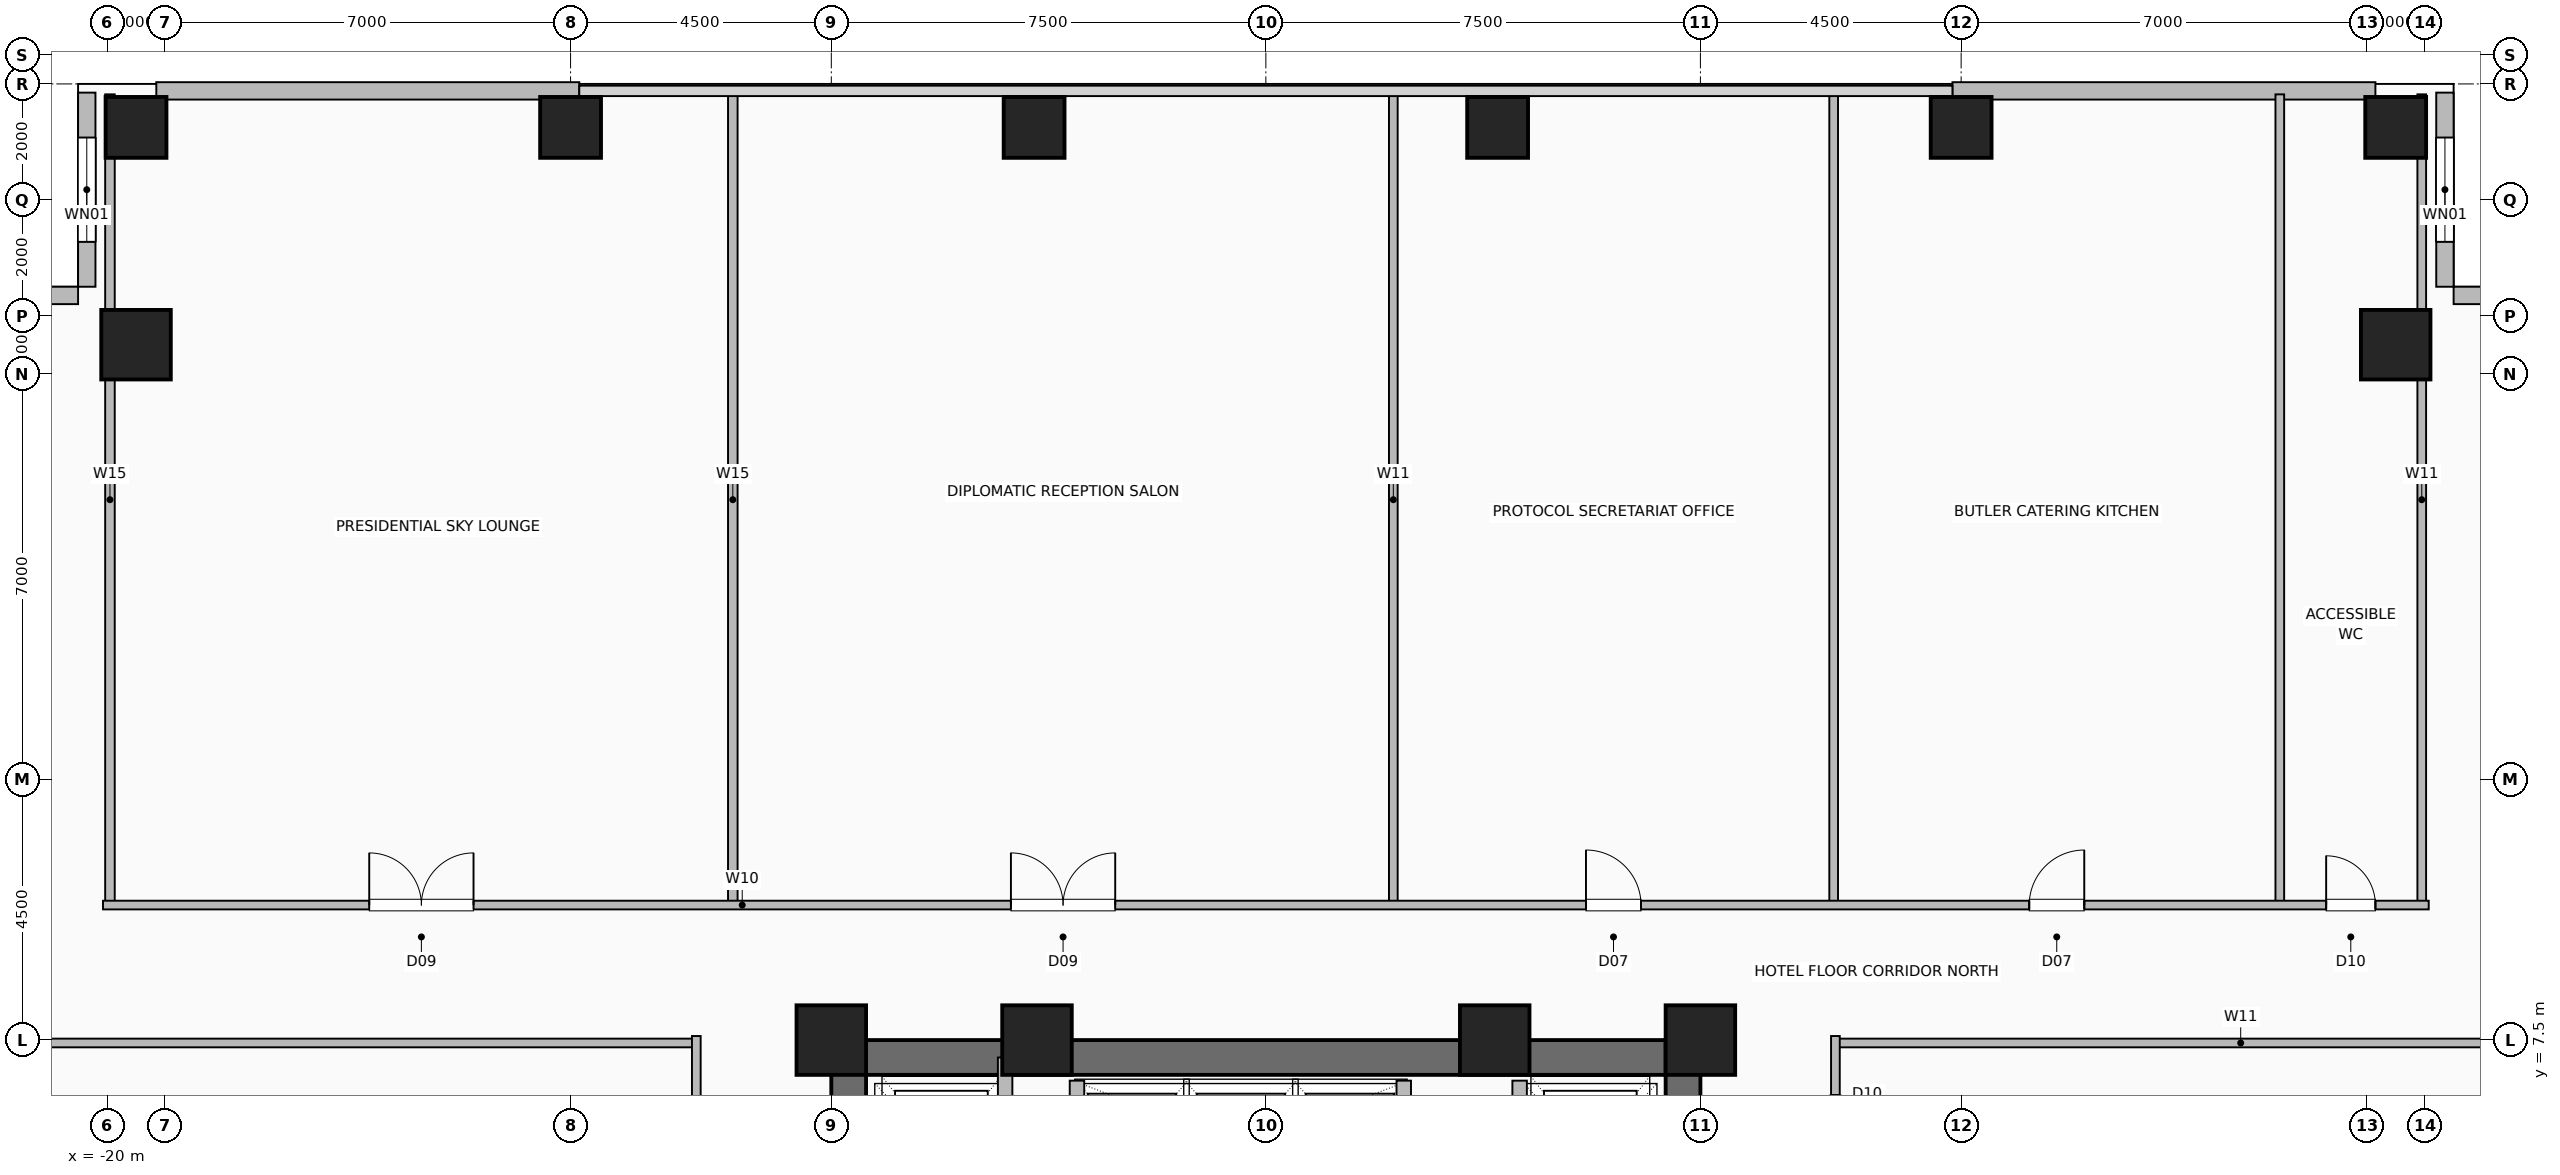
"""IFC4 building model, lengths in metres.
Left out: names, types, materials, properties, quantities, classifications, styles, units other than length and angle.
Written with IfcOpenShell. Run it as: python <this file> out.ifc"""

import sys

from ifc_helpers import new_model, si_unit, direction, frame, frame_2d, origin, origin_2d, place, context, subcontext, project, spatial, rectangle, hollow_rectangle, extrude, element, fill, save


model = new_model("IFC4")
c1 = context("Model", 3, precision=1e-05, world=origin(), true_north=direction((0.0, 1.0)))
c2 = subcontext(c1, "Body", "Model", "MODEL_VIEW")
j1 = project(units=[si_unit("LENGTHUNIT", "METRE"), si_unit("PLANEANGLEUNIT", "RADIAN")], contexts=[c1])
p1 = place(None, origin())
s1 = spatial("IfcSite", under=j1, at=p1, CompositionType="ELEMENT")
p2 = place(p1, origin())
s2 = spatial("IfcBuilding", under=s1, at=p2, CompositionType="ELEMENT")
p3 = place(p2, frame((0.0, 0.0, 76.0)))
s3 = spatial("IfcBuildingStorey", under=s2, at=p3, CompositionType="ELEMENT", Elevation=76.0)
for number, where, z_axis, x_axis in (
    (1, (7.5, 7.5, 0.0), (0.0, 0.0, 1.0), (1.0, 0.0, 0.0)),
    (2, (3.95, 7.5, 0.0), (0.0, 0.0, 1.0), (1.0, 0.0, 0.0)),
    (3, (-3.95, 7.5, 0.0), (0.0, 0.0, 1.0), (1.0, 0.0, 0.0)),
    (4, (-7.5, 7.5, 0.0), (0.0, 0.0, 1.0), (1.0, 0.0, 0.0)),
):
    element("IfcColumn", number, at=place(p3, frame(where, z_axis=z_axis, x_axis=x_axis)), inside=s3, PredefinedType="COLUMN", context=c2, shape_type="SweptSolid", body=[
        extrude(hollow_rectangle(XDim=1.2, YDim=1.2, WallThickness=0.055, at=origin_2d()), origin(), (0.0, 0.0, 1.0), 3.5),
    ])
for number, where, z_axis, x_axis in (
    (5, (-19.5, 23.25, 0.0), (0.0, 0.0, 1.0), (1.0, 0.0, 0.0)),
    (6, (-12.0, 23.25, 0.0), (0.0, 0.0, 1.0), (1.0, 0.0, 0.0)),
    (7, (-4.0, 23.25, 0.0), (0.0, 0.0, 1.0), (1.0, 0.0, 0.0)),
    (8, (4.0, 23.25, 0.0), (0.0, 0.0, 1.0), (1.0, 0.0, 0.0)),
    (9, (12.0, 23.25, 0.0), (0.0, 0.0, 1.0), (1.0, 0.0, 0.0)),
    (10, (19.5, 23.25, 0.0), (0.0, 0.0, 1.0), (1.0, 0.0, 0.0)),
):
    element("IfcColumn", number, at=place(p3, frame(where, z_axis=z_axis, x_axis=x_axis)), inside=s3, PredefinedType="COLUMN", context=c2, shape_type="SweptSolid", body=[
        extrude(hollow_rectangle(XDim=1.05, YDim=1.05, WallThickness=0.05, at=origin_2d()), origin(), (0.0, 0.0, 1.0), 3.5),
    ])
for number, where, z_axis, x_axis in (
    (11, (19.5, 19.5, 0.0), (0.0, 0.0, 1.0), (1.0, 0.0, 0.0)),
    (12, (-19.5, 19.5, 0.0), (0.0, 0.0, 1.0), (1.0, 0.0, 0.0)),
):
    element("IfcColumn", number, at=place(p3, frame(where, z_axis=z_axis, x_axis=x_axis)), inside=s3, PredefinedType="COLUMN", context=c2, shape_type="SweptSolid", body=[
        extrude(hollow_rectangle(XDim=1.2, YDim=1.2, WallThickness=0.055, at=origin_2d()), origin(), (0.0, 0.0, 1.0), 3.5),
    ])
for number, where, z_axis, x_axis in (
    (13, (-19.15, 23.88, 0.0), (0.0, 0.0, 1.0), (1.0, 0.0, 0.0)),
    (14, (11.85, 23.88, 0.0), (0.0, 0.0, 1.0), (1.0, 0.0, 0.0)),
):
    element("IfcWall", number, at=place(p3, frame(where, z_axis=z_axis, x_axis=x_axis)), inside=s3, PredefinedType="SOLIDWALL", context=c2, shape_type="SweptSolid", body=[
        extrude(rectangle(XDim=7.3, YDim=0.3, at=frame_2d((3.65, 0.0))), origin(), (0.0, 0.0, 1.0), 3.25),
    ])
p4 = place(p3, frame((20.35, 23.85, 0.0), z_axis=(0.0, 0.0, 1.0), x_axis=(0.0, -1.0, 0.0)))
e15 = element("IfcWall", 15, at=p4, inside=s3, PredefinedType="SOLIDWALL", context=c2, shape_type="SweptSolid", body=[
    extrude(rectangle(XDim=3.35, YDim=0.3, at=frame_2d((1.675, 0.0))), origin(), (0.0, 0.0, 1.0), 3.25),
])
p5 = place(p4, frame((0.775, 0.0, 0.9)))
e16 = element("IfcOpeningElement", 16, at=p5, cuts=e15, PredefinedType="OPENING", context=c2, shape_type="SweptSolid", body=[
    extrude(rectangle(XDim=1.8, YDim=1.8, at=frame_2d((0.9, 0.9))), frame((0.0, 0.16, 0.0), z_axis=(0.0, -1.0, 0.0), x_axis=(1.0, 0.0, 0.0)), (0.0, 0.0, 1.0), 0.32),
])
p6 = place(p3, frame((23.85, 20.35, 0.0), z_axis=(0.0, 0.0, 1.0), x_axis=(-1.0, 0.0, 0.0)))
e17 = element("IfcWall", 17, at=p6, inside=s3, PredefinedType="SOLIDWALL", context=c2, shape_type="SweptSolid", body=[
    extrude(rectangle(XDim=3.35, YDim=0.3, at=frame_2d((1.675, 0.0))), origin(), (0.0, 0.0, 1.0), 3.25),
])
p7 = place(p3, frame((-20.35, 23.85, 0.0), z_axis=(0.0, 0.0, 1.0), x_axis=(0.0, -1.0, 0.0)))
e18 = element("IfcWall", 18, at=p7, inside=s3, PredefinedType="SOLIDWALL", context=c2, shape_type="SweptSolid", body=[
    extrude(rectangle(XDim=3.35, YDim=0.3, at=frame_2d((1.675, 0.0))), origin(), (0.0, 0.0, 1.0), 3.25),
])
p8 = place(p7, frame((0.775, 0.0, 0.9)))
e19 = element("IfcOpeningElement", 19, at=p8, cuts=e18, PredefinedType="OPENING", context=c2, shape_type="SweptSolid", body=[
    extrude(rectangle(XDim=1.8, YDim=1.8, at=frame_2d((0.9, 0.9))), frame((0.0, 0.16, 0.0), z_axis=(0.0, -1.0, 0.0), x_axis=(1.0, 0.0, 0.0)), (0.0, 0.0, 1.0), 0.32),
])
p9 = place(p3, frame((-23.85, 20.35, 0.0), z_axis=(0.0, 0.0, 1.0), x_axis=(1.0, 0.0, 0.0)))
e20 = element("IfcWall", 20, at=p9, inside=s3, PredefinedType="SOLIDWALL", context=c2, shape_type="SweptSolid", body=[
    extrude(rectangle(XDim=3.35, YDim=0.3, at=frame_2d((1.675, 0.0))), origin(), (0.0, 0.0, 1.0), 3.25),
])
p10 = place(p3, frame((-7.5, 7.2, 0.0), z_axis=(0.0, 0.0, 1.0), x_axis=(1.0, 0.0, 0.0)))
e21 = element("IfcWall", 21, at=p10, inside=s3, PredefinedType="SHEAR", context=c2, shape_type="SweptSolid", body=[
    extrude(rectangle(XDim=15.0, YDim=0.6, at=frame_2d((7.5, 0.0))), origin(), (0.0, 0.0, 1.0), 3.25),
])
p11 = place(p3, frame((-7.2, -7.5, 0.0), z_axis=(0.0, 0.0, 1.0), x_axis=(0.0, 1.0, 0.0)))
e22 = element("IfcWall", 22, at=p11, inside=s3, PredefinedType="SHEAR", context=c2, shape_type="SweptSolid", body=[
    extrude(rectangle(XDim=15.0, YDim=0.6, at=frame_2d((7.5, 0.0))), origin(), (0.0, 0.0, 1.0), 3.25),
])
p12 = place(p11, frame((9.5, 0.0, 0.0)))
e23 = element("IfcOpeningElement", 23, at=p12, cuts=e22, PredefinedType="OPENING", context=c2, shape_type="SweptSolid", body=[
    extrude(rectangle(XDim=1.0, YDim=2.08, at=frame_2d((0.5, 1.04))), frame((0.0, 0.31, 0.0), z_axis=(0.0, -1.0, 0.0), x_axis=(1.0, 0.0, 0.0)), (0.0, 0.0, 1.0), 0.62),
])
p13 = place(p3, frame((7.2, -7.5, 0.0), z_axis=(0.0, 0.0, 1.0), x_axis=(0.0, 1.0, 0.0)))
e24 = element("IfcWall", 24, at=p13, inside=s3, PredefinedType="SHEAR", context=c2, shape_type="SweptSolid", body=[
    extrude(rectangle(XDim=15.0, YDim=0.6, at=frame_2d((7.5, 0.0))), origin(), (0.0, 0.0, 1.0), 3.25),
])
for number, where, z_axis, x_axis in (
    (25, (-3.26, 4.58, 0.0), (0.0, 0.0, 1.0), (0.0, 1.0, 0.0)),
    (26, (2.38, 4.58, 0.0), (0.0, 0.0, 1.0), (0.0, 1.0, 0.0)),
):
    element("IfcWall", number, at=place(p3, frame(where, z_axis=z_axis, x_axis=x_axis)), inside=s3, PredefinedType="SHEAR", context=c2, shape_type="SweptSolid", body=[
        extrude(rectangle(XDim=2.22, YDim=0.25, at=frame_2d((1.11, 0.0))), origin(), (0.0, 0.0, 1.0), 3.25),
    ])
p14 = place(p3, frame((-4.5, 4.35, 0.0), z_axis=(0.0, 0.0, 1.0), x_axis=(0.0, 1.0, 0.0)))
e27 = element("IfcWall", 27, at=p14, inside=s3, PredefinedType="SHEAR", context=c2, shape_type="SweptSolid", body=[
    extrude(rectangle(XDim=2.85, YDim=0.25, at=frame_2d((1.425, 0.0))), origin(), (0.0, 0.0, 1.0), 3.25),
])
p15 = place(p3, frame((4.38, 4.3, 0.0), z_axis=(0.0, 0.0, 1.0), x_axis=(0.0, 1.0, 0.0)))
e28 = element("IfcWall", 28, at=p15, inside=s3, PredefinedType="SHEAR", context=c2, shape_type="SweptSolid", body=[
    extrude(rectangle(XDim=2.5, YDim=0.25, at=frame_2d((1.25, 0.0))), origin(), (0.0, 0.0, 1.0), 3.25),
])
p16 = place(p15, frame((0.8, 0.0, 0.0)))
e29 = element("IfcOpeningElement", 29, at=p16, cuts=e28, PredefinedType="OPENING", context=c2, shape_type="SweptSolid", body=[
    extrude(rectangle(XDim=1.2, YDim=2.2, at=frame_2d((0.6, 1.1))), frame((0.0, 0.135, 0.0), z_axis=(0.0, -1.0, 0.0), x_axis=(1.0, 0.0, 0.0)), (0.0, 0.0, 1.0), 0.27),
])
for number, where, z_axis, x_axis in (
    (30, (-19.95, 9.83, 0.0), (0.0, 0.0, 1.0), (0.0, 1.0, 0.0)),
    (31, (-9.2, 9.83, 0.0), (0.0, 0.0, 1.0), (0.0, 1.0, 0.0)),
):
    element("IfcWall", number, at=place(p3, frame(where, z_axis=z_axis, x_axis=x_axis)), inside=s3, PredefinedType="PLUMBINGWALL", context=c2, shape_type="SweptSolid", body=[
        extrude(rectangle(XDim=13.99, YDim=0.165, at=frame_2d((6.995, 0.0))), origin(), (0.0, 0.0, 1.0), 3.25),
    ])
for number, where, z_axis, x_axis in (
    (32, (2.2, 9.83, 0.0), (0.0, 0.0, 1.0), (0.0, 1.0, 0.0)),
    (33, (9.8, 9.83, 0.0), (0.0, 0.0, 1.0), (0.0, 1.0, 0.0)),
    (34, (17.5, 9.83, 0.0), (0.0, 0.0, 1.0), (0.0, 1.0, 0.0)),
    (35, (19.95, 9.83, 0.0), (0.0, 0.0, 1.0), (0.0, 1.0, 0.0)),
):
    element("IfcWall", number, at=place(p3, frame(where, z_axis=z_axis, x_axis=x_axis)), inside=s3, PredefinedType="PARTITIONING", context=c2, shape_type="SweptSolid", body=[
        extrude(rectangle(XDim=13.99, YDim=0.15, at=frame_2d((6.995, 0.0))), origin(), (0.0, 0.0, 1.0), 3.25),
    ])
p17 = place(p3, frame((-20.07, 9.83, 0.0), z_axis=(0.0, 0.0, 1.0), x_axis=(1.0, 0.0, 0.0)))
e36 = element("IfcWall", 36, at=p17, inside=s3, PredefinedType="PARTITIONING", context=c2, shape_type="SweptSolid", body=[
    extrude(rectangle(XDim=40.14, YDim=0.15, at=frame_2d((20.07, 0.0))), origin(), (0.0, 0.0, 1.0), 3.25),
])
p18 = place(p17, frame((4.595, 0.0, 0.0)))
e37 = element("IfcOpeningElement", 37, at=p18, cuts=e36, PredefinedType="OPENING", context=c2, shape_type="SweptSolid", body=[
    extrude(rectangle(XDim=1.8, YDim=2.08, at=frame_2d((0.9, 1.04))), frame((0.0, 0.085, 0.0), z_axis=(0.0, -1.0, 0.0), x_axis=(1.0, 0.0, 0.0)), (0.0, 0.0, 1.0), 0.17),
])
p19 = place(p17, frame((15.67, 0.0, 0.0)))
e38 = element("IfcOpeningElement", 38, at=p19, cuts=e36, PredefinedType="OPENING", context=c2, shape_type="SweptSolid", body=[
    extrude(rectangle(XDim=1.8, YDim=2.08, at=frame_2d((0.9, 1.04))), frame((0.0, 0.085, 0.0), z_axis=(0.0, -1.0, 0.0), x_axis=(1.0, 0.0, 0.0)), (0.0, 0.0, 1.0), 0.17),
])
p20 = place(p17, frame((25.595, 0.0, 0.0)))
e39 = element("IfcOpeningElement", 39, at=p20, cuts=e36, PredefinedType="OPENING", context=c2, shape_type="SweptSolid", body=[
    extrude(rectangle(XDim=0.95, YDim=2.06, at=frame_2d((0.475, 1.03))), frame((0.0, 0.085, 0.0), z_axis=(0.0, -1.0, 0.0), x_axis=(1.0, 0.0, 0.0)), (0.0, 0.0, 1.0), 0.17),
])
p21 = place(p17, frame((33.245, 0.0, 0.0)))
e40 = element("IfcOpeningElement", 40, at=p21, cuts=e36, PredefinedType="OPENING", context=c2, shape_type="SweptSolid", body=[
    extrude(rectangle(XDim=0.95, YDim=2.06, at=frame_2d((0.475, 1.03))), frame((0.0, 0.085, 0.0), z_axis=(0.0, -1.0, 0.0), x_axis=(1.0, 0.0, 0.0)), (0.0, 0.0, 1.0), 0.17),
])
p22 = place(p17, frame((38.37, 0.0, 0.0)))
e41 = element("IfcOpeningElement", 41, at=p22, cuts=e36, PredefinedType="OPENING", context=c2, shape_type="SweptSolid", body=[
    extrude(rectangle(XDim=0.85, YDim=2.05, at=frame_2d((0.425, 1.025))), frame((0.0, 0.085, 0.0), z_axis=(0.0, -1.0, 0.0), x_axis=(1.0, 0.0, 0.0)), (0.0, 0.0, 1.0), 0.17),
])
p23 = place(p3, frame((-23.82, 7.45, 0.0), z_axis=(0.0, 0.0, 1.0), x_axis=(1.0, 0.0, 0.0)))
e42 = element("IfcWall", 42, at=p23, inside=s3, PredefinedType="PARTITIONING", context=c2, shape_type="SweptSolid", body=[
    extrude(rectangle(XDim=13.99, YDim=0.15, at=frame_2d((6.995, 0.0))), origin(), (0.0, 0.0, 1.0), 3.25),
])
p24 = place(p3, frame((-9.83, -7.57, 0.0), z_axis=(0.0, 0.0, 1.0), x_axis=(0.0, 1.0, 0.0)))
e43 = element("IfcWall", 43, at=p24, inside=s3, PredefinedType="PARTITIONING", context=c2, shape_type="SweptSolid", body=[
    extrude(rectangle(XDim=15.14, YDim=0.15, at=frame_2d((7.57, 0.0))), origin(), (0.0, 0.0, 1.0), 3.25),
])
p25 = place(p24, frame((2.12, 0.0, 0.0)))
e44 = element("IfcOpeningElement", 44, at=p25, cuts=e43, PredefinedType="OPENING", context=c2, shape_type="SweptSolid", body=[
    extrude(rectangle(XDim=0.95, YDim=2.06, at=frame_2d((0.475, 1.03))), frame((0.0, 0.085, 0.0), z_axis=(0.0, -1.0, 0.0), x_axis=(1.0, 0.0, 0.0)), (0.0, 0.0, 1.0), 0.17),
])
p26 = place(p24, frame((7.095, 0.0, 0.0)))
e45 = element("IfcOpeningElement", 45, at=p26, cuts=e43, PredefinedType="OPENING", context=c2, shape_type="SweptSolid", body=[
    extrude(rectangle(XDim=0.95, YDim=2.06, at=frame_2d((0.475, 1.03))), frame((0.0, 0.085, 0.0), z_axis=(0.0, -1.0, 0.0), x_axis=(1.0, 0.0, 0.0)), (0.0, 0.0, 1.0), 0.17),
])
p27 = place(p24, frame((12.07, 0.0, 0.0)))
e46 = element("IfcOpeningElement", 46, at=p27, cuts=e43, PredefinedType="OPENING", context=c2, shape_type="SweptSolid", body=[
    extrude(rectangle(XDim=0.95, YDim=2.06, at=frame_2d((0.475, 1.03))), frame((0.0, 0.085, 0.0), z_axis=(0.0, -1.0, 0.0), x_axis=(1.0, 0.0, 0.0)), (0.0, 0.0, 1.0), 0.17),
])
p28 = place(p3, frame((9.83, 7.45, 0.0), z_axis=(0.0, 0.0, 1.0), x_axis=(1.0, 0.0, 0.0)))
e47 = element("IfcWall", 47, at=p28, inside=s3, PredefinedType="PARTITIONING", context=c2, shape_type="SweptSolid", body=[
    extrude(rectangle(XDim=13.99, YDim=0.15, at=frame_2d((6.995, 0.0))), origin(), (0.0, 0.0, 1.0), 3.25),
])
p29 = place(p3, frame((9.83, -7.57, 0.0), z_axis=(0.0, 0.0, 1.0), x_axis=(0.0, 1.0, 0.0)))
e48 = element("IfcWall", 48, at=p29, inside=s3, PredefinedType="PARTITIONING", context=c2, shape_type="SweptSolid", body=[
    extrude(rectangle(XDim=15.14, YDim=0.15, at=frame_2d((7.57, 0.0))), origin(), (0.0, 0.0, 1.0), 3.25),
])
p30 = place(p29, frame((2.27, 0.0, 0.0)))
e49 = element("IfcOpeningElement", 49, at=p30, cuts=e48, PredefinedType="OPENING", context=c2, shape_type="SweptSolid", body=[
    extrude(rectangle(XDim=0.95, YDim=2.06, at=frame_2d((0.475, 1.03))), frame((0.0, 0.085, 0.0), z_axis=(0.0, -1.0, 0.0), x_axis=(1.0, 0.0, 0.0)), (0.0, 0.0, 1.0), 0.17),
])
p31 = place(p29, frame((8.395, 0.0, 0.0)))
e50 = element("IfcOpeningElement", 50, at=p31, cuts=e48, PredefinedType="OPENING", context=c2, shape_type="SweptSolid", body=[
    extrude(rectangle(XDim=0.95, YDim=2.06, at=frame_2d((0.475, 1.03))), frame((0.0, 0.085, 0.0), z_axis=(0.0, -1.0, 0.0), x_axis=(1.0, 0.0, 0.0)), (0.0, 0.0, 1.0), 0.17),
])
p32 = place(p29, frame((13.27, 0.0, 0.0)))
e51 = element("IfcOpeningElement", 51, at=p32, cuts=e48, PredefinedType="OPENING", context=c2, shape_type="SweptSolid", body=[
    extrude(rectangle(XDim=0.85, YDim=2.05, at=frame_2d((0.425, 1.025))), frame((0.0, 0.085, 0.0), z_axis=(0.0, -1.0, 0.0), x_axis=(1.0, 0.0, 0.0)), (0.0, 0.0, 1.0), 0.17),
])
p33 = place(p5, origin())
e52 = element("IfcWindow", 52, at=p33, inside=s3, PartitioningType="SINGLE_PANEL", PredefinedType="WINDOW", context=c2, shape_type="SweptSolid", body=[
    extrude(rectangle(XDim=1.8, YDim=1.8, at=frame_2d((0.9, 0.9))), frame((0.0, 0.03, 0.0), z_axis=(0.0, -1.0, 0.0), x_axis=(1.0, 0.0, 0.0)), (0.0, 0.0, 1.0), 0.06),
])
fill(e16, e52)
p34 = place(p8, origin())
e53 = element("IfcWindow", 53, at=p34, inside=s3, PartitioningType="SINGLE_PANEL", PredefinedType="WINDOW", context=c2, shape_type="SweptSolid", body=[
    extrude(rectangle(XDim=1.8, YDim=1.8, at=frame_2d((0.9, 0.9))), frame((0.0, 0.03, 0.0), z_axis=(0.0, -1.0, 0.0), x_axis=(1.0, 0.0, 0.0)), (0.0, 0.0, 1.0), 0.06),
])
fill(e19, e53)
p35 = place(p18, origin())
e54 = element("IfcDoor", 54, at=p35, inside=s3, OperationType="DOUBLE_DOOR_SINGLE_SWING", PredefinedType="DOOR", context=c2, shape_type="SweptSolid", body=[
    extrude(rectangle(XDim=1.8, YDim=2.08, at=frame_2d((0.9, 1.04))), frame((0.0, 0.025, 0.0), z_axis=(0.0, -1.0, 0.0), x_axis=(1.0, 0.0, 0.0)), (0.0, 0.0, 1.0), 0.05),
])
fill(e37, e54)
p36 = place(p19, origin())
e55 = element("IfcDoor", 55, at=p36, inside=s3, OperationType="DOUBLE_DOOR_SINGLE_SWING", PredefinedType="DOOR", context=c2, shape_type="SweptSolid", body=[
    extrude(rectangle(XDim=1.8, YDim=2.08, at=frame_2d((0.9, 1.04))), frame((0.0, 0.025, 0.0), z_axis=(0.0, -1.0, 0.0), x_axis=(1.0, 0.0, 0.0)), (0.0, 0.0, 1.0), 0.05),
])
fill(e38, e55)
p37 = place(p20, origin())
e56 = element("IfcDoor", 56, at=p37, inside=s3, OperationType="SINGLE_SWING_LEFT", PredefinedType="DOOR", context=c2, shape_type="SweptSolid", body=[
    extrude(rectangle(XDim=0.95, YDim=2.06, at=frame_2d((0.475, 1.03))), frame((0.0, 0.025, 0.0), z_axis=(0.0, -1.0, 0.0), x_axis=(1.0, 0.0, 0.0)), (0.0, 0.0, 1.0), 0.05),
])
fill(e39, e56)
p38 = place(p21, origin())
e57 = element("IfcDoor", 57, at=p38, inside=s3, OperationType="SINGLE_SWING_RIGHT", PredefinedType="DOOR", context=c2, shape_type="SweptSolid", body=[
    extrude(rectangle(XDim=0.95, YDim=2.06, at=frame_2d((0.475, 1.03))), frame((0.0, 0.025, 0.0), z_axis=(0.0, -1.0, 0.0), x_axis=(1.0, 0.0, 0.0)), (0.0, 0.0, 1.0), 0.05),
])
fill(e40, e57)
p39 = place(p22, origin())
e58 = element("IfcDoor", 58, at=p39, inside=s3, OperationType="SINGLE_SWING_LEFT", PredefinedType="DOOR", context=c2, shape_type="SweptSolid", body=[
    extrude(rectangle(XDim=0.85, YDim=2.05, at=frame_2d((0.425, 1.025))), frame((0.0, 0.025, 0.0), z_axis=(0.0, -1.0, 0.0), x_axis=(1.0, 0.0, 0.0)), (0.0, 0.0, 1.0), 0.05),
])
fill(e41, e58)
save(model, sys.argv[1])
